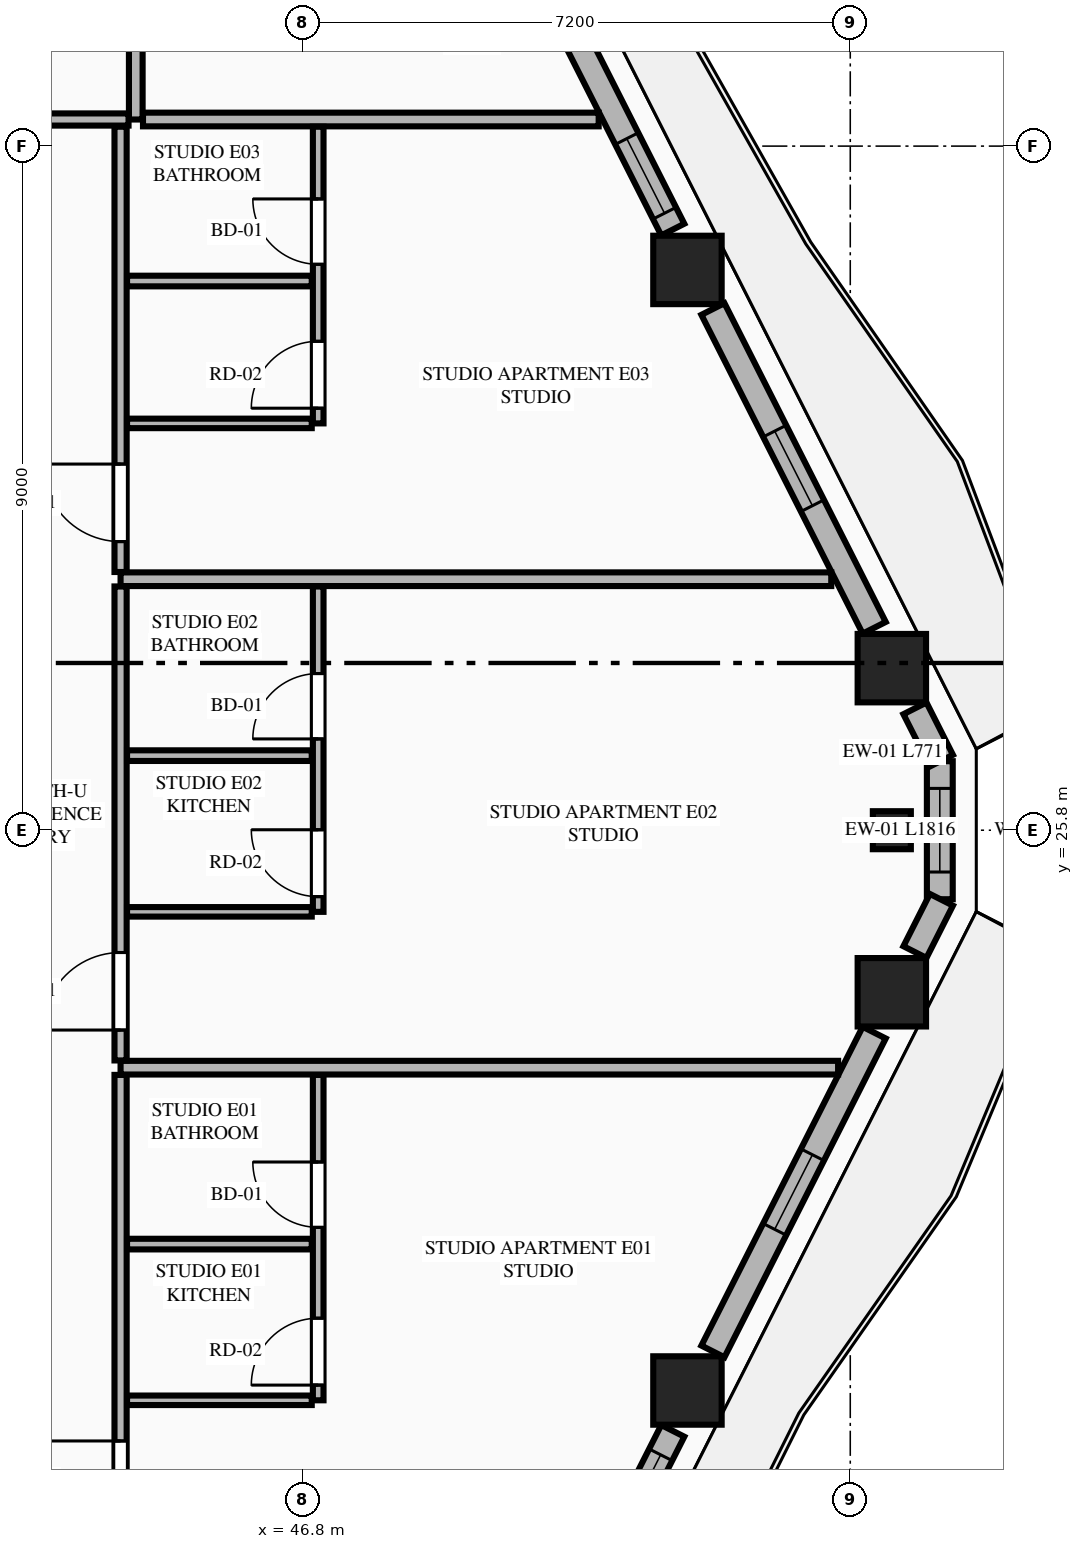
"""IFC4 building model, lengths in metres.
Left out: names, types, materials, properties, quantities, classifications, styles, units other than length and angle.
Written with IfcOpenShell. Run it as: python <this file> out.ifc"""

import sys

from ifc_helpers import new_model, si_unit, direction, frame, frame_2d, origin, origin_2d, place, context, subcontext, project, spatial, rectangle, extrude, element, fill, save


model = new_model("IFC4")
c1 = context("Model", 3, precision=1e-05, world=origin(), true_north=direction((0.0, 1.0)))
c2 = subcontext(c1, "Body", "Model", "MODEL_VIEW")
j1 = project(units=[si_unit("LENGTHUNIT", "METRE"), si_unit("PLANEANGLEUNIT", "RADIAN")], contexts=[c1])
p1 = place(None, origin())
s1 = spatial("IfcSite", under=j1, at=p1, CompositionType="ELEMENT")
p2 = place(p1, origin())
s2 = spatial("IfcBuilding", under=s1, at=p2, CompositionType="ELEMENT")
p3 = place(p2, frame((0.0, 0.0, 189.65)))
s3 = spatial("IfcBuildingStorey", under=s2, at=p3, CompositionType="ELEMENT", Elevation=189.65)
for number, where, z_axis, x_axis in (
    (1, (51.858, 18.429, 0.0), (0.0, 0.0, 1.0), (1.0, 0.0, 0.0)),
    (2, (54.547, 23.668, 0.0), (0.0, 0.0, 1.0), (1.0, 0.0, 0.0)),
    (3, (54.547, 27.932, 0.0), (0.0, 0.0, 1.0), (1.0, 0.0, 0.0)),
    (4, (51.858, 33.171, 0.0), (0.0, 0.0, 1.0), (1.0, 0.0, 0.0)),
):
    element("IfcColumn", number, at=place(p3, frame(where, z_axis=z_axis, x_axis=x_axis)), inside=s3, PredefinedType="COLUMN", context=c2, shape_type="SweptSolid", body=[
        extrude(rectangle(XDim=0.9, YDim=0.9, at=origin_2d()), origin(), (0.0, 0.0, 1.0), 3.55),
    ])
p4 = place(p3, frame((54.547, 25.8, 0.0), z_axis=(0.0, 0.0, 1.0), x_axis=(0.0, 1.0, 0.0)))
e5 = element("IfcColumn", 5, at=p4, inside=s3, PredefinedType="PILASTER", context=c2, shape_type="SweptSolid", body=[
    extrude(rectangle(XDim=0.5, YDim=0.35, at=origin_2d()), origin(), (0.0, 0.0, 1.0), 3.55),
])
p5 = place(p3, frame((55.178, 24.892, 0.0), z_axis=(0.0, 0.0, 1.0), x_axis=(0.0, 1.0, 0.0)))
e6 = element("IfcWall", 6, at=p5, inside=s3, PredefinedType="STANDARD", context=c2, shape_type="SweptSolid", body=[
    extrude(rectangle(XDim=1.816, YDim=0.34, at=frame_2d((0.908, 0.0))), origin(), (0.0, 0.0, 1.0), 3.35),
])
p6 = place(p5, frame((0.358, 0.0, 0.75)))
e7 = element("IfcOpeningElement", 7, at=p6, cuts=e6, PredefinedType="OPENING", context=c2, shape_type="SweptSolid", body=[
    extrude(rectangle(XDim=1.1, YDim=2.0, at=frame_2d((0.55, 1.0))), frame((0.0, 0.18, 0.0), z_axis=(0.0, -1.0, 0.0), x_axis=(1.0, 0.0, 0.0)), (0.0, 0.0, 1.0), 0.36),
])
p7 = place(p3, frame((49.448, 13.517, 0.0), z_axis=(0.0, 0.0, 1.0), x_axis=(0.451544279509, 0.892248711763, 0.0)))
e8 = element("IfcWall", 8, at=p7, inside=s3, PredefinedType="STANDARD", context=c2, shape_type="SweptSolid", body=[
    extrude(rectangle(XDim=4.91, YDim=0.34, at=frame_2d((2.455, 0.0))), origin(), (0.0, 0.0, 1.0), 2.883),
])
p8 = place(p7, frame((0.856, 0.0, 0.0)))
e9 = element("IfcOpeningElement", 9, at=p8, cuts=e8, PredefinedType="OPENING", context=c2, shape_type="SweptSolid", body=[
    extrude(rectangle(XDim=1.1, YDim=2.25, at=frame_2d((0.55, 1.125))), frame((0.0, 0.18, 0.0), z_axis=(0.0, -1.0, 0.0), x_axis=(1.0, 0.0, 0.0)), (0.0, 0.0, 1.0), 0.36),
])
p9 = place(p7, frame((3.457, 0.0, 0.75)))
e10 = element("IfcOpeningElement", 10, at=p9, cuts=e8, PredefinedType="OPENING", context=c2, shape_type="SweptSolid", body=[
    extrude(rectangle(XDim=1.1, YDim=1.983, at=frame_2d((0.55, 0.991))), frame((0.0, 0.18, 0.0), z_axis=(0.0, -1.0, 0.0), x_axis=(1.0, 0.0, 0.0)), (0.0, 0.0, 1.0), 0.36),
])
p10 = place(p3, frame((52.193, 18.943, 0.0), z_axis=(0.0, 0.0, 1.0), x_axis=(0.451447222193, 0.892297823361, 0.0)))
e11 = element("IfcWall", 11, at=p10, inside=s3, PredefinedType="STANDARD", context=c2, shape_type="SweptSolid", body=[
    extrude(rectangle(XDim=4.7, YDim=0.34, at=frame_2d((2.35, 0.0))), origin(), (0.0, 0.0, 1.0), 2.883),
])
p11 = place(p10, frame((1.8, 0.0, 0.75)))
e12 = element("IfcOpeningElement", 12, at=p11, cuts=e11, PredefinedType="OPENING", context=c2, shape_type="SweptSolid", body=[
    extrude(rectangle(XDim=1.1, YDim=1.983, at=frame_2d((0.55, 0.991))), frame((0.0, 0.18, 0.0), z_axis=(0.0, -1.0, 0.0), x_axis=(1.0, 0.0, 0.0)), (0.0, 0.0, 1.0), 0.36),
])
for number, where, z_axis, x_axis in (
    (13, (54.851, 24.197, 0.0), (0.0, 0.0, 1.0), (0.451, 0.892, 0.0)),
    (14, (55.199, 26.715, 0.0), (0.0, 0.0, 1.0), (-0.451, 0.892, 0.0)),
):
    element("IfcWall", number, at=place(p3, frame(where, z_axis=z_axis, x_axis=x_axis)), inside=s3, PredefinedType="STANDARD", context=c2, shape_type="SweptSolid", body=[
        extrude(rectangle(XDim=0.771, YDim=0.34, at=frame_2d((0.385, 0.0))), origin(), (0.0, 0.0, 1.0), 3.35),
    ])
p12 = place(p3, frame((54.315, 28.463, 0.0), z_axis=(0.0, 0.0, 1.0), x_axis=(-0.451426298588, 0.892308409096, 0.0)))
e15 = element("IfcWall", 15, at=p12, inside=s3, PredefinedType="STANDARD", context=c2, shape_type="SweptSolid", body=[
    extrude(rectangle(XDim=4.7, YDim=0.34, at=frame_2d((2.35, 0.0))), origin(), (0.0, 0.0, 1.0), 2.883),
])
p13 = place(p12, frame((1.8, 0.0, 0.75)))
e16 = element("IfcOpeningElement", 16, at=p13, cuts=e15, PredefinedType="OPENING", context=c2, shape_type="SweptSolid", body=[
    extrude(rectangle(XDim=1.1, YDim=1.983, at=frame_2d((0.55, 0.991))), frame((0.0, 0.18, 0.0), z_axis=(0.0, -1.0, 0.0), x_axis=(1.0, 0.0, 0.0)), (0.0, 0.0, 1.0), 0.36),
])
p14 = place(p3, frame((51.665, 33.702, 0.0), z_axis=(0.0, 0.0, 1.0), x_axis=(-0.451524246964, 0.89225884944, 0.0)))
e17 = element("IfcWall", 17, at=p14, inside=s3, PredefinedType="STANDARD", context=c2, shape_type="SweptSolid", body=[
    extrude(rectangle(XDim=4.91, YDim=0.34, at=frame_2d((2.455, 0.0))), origin(), (0.0, 0.0, 1.0), 2.883),
])
p15 = place(p14, frame((2.842, 0.0, 0.0)))
e18 = element("IfcOpeningElement", 18, at=p15, cuts=e17, PredefinedType="OPENING", context=c2, shape_type="SweptSolid", body=[
    extrude(rectangle(XDim=1.1, YDim=2.25, at=frame_2d((0.55, 1.125))), frame((0.0, 0.18, 0.0), z_axis=(0.0, -1.0, 0.0), x_axis=(1.0, 0.0, 0.0)), (0.0, 0.0, 1.0), 0.36),
])
p16 = place(p14, frame((0.241, 0.0, 0.75)))
e19 = element("IfcOpeningElement", 19, at=p16, cuts=e17, PredefinedType="OPENING", context=c2, shape_type="SweptSolid", body=[
    extrude(rectangle(XDim=1.1, YDim=1.983, at=frame_2d((0.55, 0.991))), frame((0.0, 0.18, 0.0), z_axis=(0.0, -1.0, 0.0), x_axis=(1.0, 0.0, 0.0)), (0.0, 0.0, 1.0), 0.36),
])
p17 = place(p3, frame((44.6, 35.15, 0.0), z_axis=(0.0, 0.0, 1.0), x_axis=(0.0, 1.0, 0.0)))
e20 = element("IfcWall", 20, at=p17, inside=s3, PredefinedType="PARTITIONING", context=c2, shape_type="SweptSolid", body=[
    extrude(rectangle(XDim=10.482, YDim=0.18, at=frame_2d((5.241, 0.0))), origin(), (0.0, 0.0, 1.0), 3.35),
])
p18 = place(p3, frame((20.295, 35.15, 0.0), z_axis=(0.0, 0.0, 1.0), x_axis=(1.0, 0.0, 0.0)))
e21 = element("IfcWall", 21, at=p18, inside=s3, PredefinedType="PARTITIONING", context=c2, shape_type="SweptSolid", body=[
    extrude(rectangle(XDim=24.21, YDim=0.16, at=frame_2d((12.105, 0.0))), origin(), (0.0, 0.0, 1.0), 3.35),
])
p19 = place(p18, frame((0.405, 0.0, 0.0)))
e22 = element("IfcOpeningElement", 22, at=p19, cuts=e21, PredefinedType="OPENING", context=c2, shape_type="SweptSolid", body=[
    extrude(rectangle(XDim=1.35, YDim=2.35, at=frame_2d((0.675, 1.175))), frame((0.0, 0.09, 0.0), z_axis=(0.0, -1.0, 0.0), x_axis=(1.0, 0.0, 0.0)), (0.0, 0.0, 1.0), 0.18),
])
p20 = place(p3, frame((44.695, 35.15, 0.0), z_axis=(0.0, 0.0, 1.0), x_axis=(1.0, 0.0, 0.0)))
e23 = element("IfcWall", 23, at=p20, inside=s3, PredefinedType="PARTITIONING", context=c2, shape_type="SweptSolid", body=[
    extrude(rectangle(XDim=5.995, YDim=0.18, at=frame_2d((2.998, 0.0))), origin(), (0.0, 0.0, 1.0), 3.35),
])
p21 = place(p3, frame((44.4, 16.345, 0.0), z_axis=(0.0, 0.0, 1.0), x_axis=(0.0, 1.0, 0.0)))
e24 = element("IfcWall", 24, at=p21, inside=s3, PredefinedType="PARTITIONING", context=c2, shape_type="SweptSolid", body=[
    extrude(rectangle(XDim=6.236, YDim=0.16, at=frame_2d((3.118, 0.0))), origin(), (0.0, 0.0, 1.0), 3.35),
])
p22 = place(p21, frame((0.4, 0.0, 0.0)))
e25 = element("IfcOpeningElement", 25, at=p22, cuts=e24, PredefinedType="OPENING", context=c2, shape_type="SweptSolid", body=[
    extrude(rectangle(XDim=1.02, YDim=2.25, at=frame_2d((0.51, 1.125))), frame((0.0, 0.09, 0.0), z_axis=(0.0, -1.0, 0.0), x_axis=(1.0, 0.0, 0.0)), (0.0, 0.0, 1.0), 0.18),
])
p23 = place(p3, frame((44.485, 18.3, 0.0), z_axis=(0.0, 0.0, 1.0), x_axis=(1.0, 0.0, 0.0)))
e26 = element("IfcWall", 26, at=p23, inside=s3, PredefinedType="PARTITIONING", context=c2, shape_type="SweptSolid", body=[
    extrude(rectangle(XDim=2.43, YDim=0.125, at=frame_2d((1.215, 0.0))), origin(), (0.0, 0.0, 1.0), 2.807),
])
p24 = place(p3, frame((47.0, 18.3, 0.0), z_axis=(0.0, 0.0, 1.0), x_axis=(0.0, 1.0, 0.0)))
e27 = element("IfcWall", 27, at=p24, inside=s3, PredefinedType="PLUMBINGWALL", context=c2, shape_type="SweptSolid", body=[
    extrude(rectangle(XDim=4.281, YDim=0.14, at=frame_2d((2.141, 0.0))), origin(), (0.0, 0.0, 1.0), 3.35),
])
p25 = place(p24, frame((2.275, 0.0, 0.0)))
e28 = element("IfcOpeningElement", 28, at=p25, cuts=e27, PredefinedType="OPENING", context=c2, shape_type="SweptSolid", body=[
    extrude(rectangle(XDim=0.86, YDim=2.1, at=frame_2d((0.43, 1.05))), frame((0.0, 0.08, 0.0), z_axis=(0.0, -1.0, 0.0), x_axis=(1.0, 0.0, 0.0)), (0.0, 0.0, 1.0), 0.16),
])
p26 = place(p24, frame((0.2, 0.0, 0.0)))
e29 = element("IfcOpeningElement", 29, at=p26, cuts=e27, PredefinedType="OPENING", context=c2, shape_type="SweptSolid", body=[
    extrude(rectangle(XDim=0.88, YDim=2.15, at=frame_2d((0.44, 1.075))), frame((0.0, 0.08, 0.0), z_axis=(0.0, -1.0, 0.0), x_axis=(1.0, 0.0, 0.0)), (0.0, 0.0, 1.0), 0.16),
])
p27 = place(p3, frame((44.485, 20.355, 0.0), z_axis=(0.0, 0.0, 1.0), x_axis=(1.0, 0.0, 0.0)))
e30 = element("IfcWall", 30, at=p27, inside=s3, PredefinedType="PLUMBINGWALL", context=c2, shape_type="SweptSolid", body=[
    extrude(rectangle(XDim=2.43, YDim=0.14, at=frame_2d((1.215, 0.0))), origin(), (0.0, 0.0, 1.0), 3.35),
])
p28 = place(p3, frame((44.4, 22.676, 0.0), z_axis=(0.0, 0.0, 1.0), x_axis=(1.0, 0.0, 0.0)))
e31 = element("IfcWall", 31, at=p28, inside=s3, PredefinedType="PARTITIONING", context=c2, shape_type="SweptSolid", body=[
    extrude(rectangle(XDim=9.44, YDim=0.18, at=frame_2d((4.72, 0.0))), origin(), (0.0, 0.0, 1.0), 3.35),
])
p29 = place(p3, frame((44.4, 22.771, 0.0), z_axis=(0.0, 0.0, 1.0), x_axis=(0.0, 1.0, 0.0)))
e32 = element("IfcWall", 32, at=p29, inside=s3, PredefinedType="PARTITIONING", context=c2, shape_type="SweptSolid", body=[
    extrude(rectangle(XDim=6.236, YDim=0.16, at=frame_2d((3.118, 0.0))), origin(), (0.0, 0.0, 1.0), 3.35),
])
p30 = place(p29, frame((0.4, 0.0, 0.0)))
e33 = element("IfcOpeningElement", 33, at=p30, cuts=e32, PredefinedType="OPENING", context=c2, shape_type="SweptSolid", body=[
    extrude(rectangle(XDim=1.02, YDim=2.25, at=frame_2d((0.51, 1.125))), frame((0.0, 0.09, 0.0), z_axis=(0.0, -1.0, 0.0), x_axis=(1.0, 0.0, 0.0)), (0.0, 0.0, 1.0), 0.18),
])
p31 = place(p3, frame((44.485, 24.726, 0.0), z_axis=(0.0, 0.0, 1.0), x_axis=(1.0, 0.0, 0.0)))
e34 = element("IfcWall", 34, at=p31, inside=s3, PredefinedType="PARTITIONING", context=c2, shape_type="SweptSolid", body=[
    extrude(rectangle(XDim=2.43, YDim=0.125, at=frame_2d((1.215, 0.0))), origin(), (0.0, 0.0, 1.0), 3.35),
])
p32 = place(p3, frame((47.0, 24.726, 0.0), z_axis=(0.0, 0.0, 1.0), x_axis=(0.0, 1.0, 0.0)))
e35 = element("IfcWall", 35, at=p32, inside=s3, PredefinedType="PLUMBINGWALL", context=c2, shape_type="SweptSolid", body=[
    extrude(rectangle(XDim=4.281, YDim=0.14, at=frame_2d((2.141, 0.0))), origin(), (0.0, 0.0, 1.0), 3.35),
])
p33 = place(p32, frame((2.275, 0.0, 0.0)))
e36 = element("IfcOpeningElement", 36, at=p33, cuts=e35, PredefinedType="OPENING", context=c2, shape_type="SweptSolid", body=[
    extrude(rectangle(XDim=0.86, YDim=2.1, at=frame_2d((0.43, 1.05))), frame((0.0, 0.08, 0.0), z_axis=(0.0, -1.0, 0.0), x_axis=(1.0, 0.0, 0.0)), (0.0, 0.0, 1.0), 0.16),
])
p34 = place(p32, frame((0.2, 0.0, 0.0)))
e37 = element("IfcOpeningElement", 37, at=p34, cuts=e35, PredefinedType="OPENING", context=c2, shape_type="SweptSolid", body=[
    extrude(rectangle(XDim=0.88, YDim=2.15, at=frame_2d((0.44, 1.075))), frame((0.0, 0.08, 0.0), z_axis=(0.0, -1.0, 0.0), x_axis=(1.0, 0.0, 0.0)), (0.0, 0.0, 1.0), 0.16),
])
p35 = place(p3, frame((44.485, 26.781, 0.0), z_axis=(0.0, 0.0, 1.0), x_axis=(1.0, 0.0, 0.0)))
e38 = element("IfcWall", 38, at=p35, inside=s3, PredefinedType="PLUMBINGWALL", context=c2, shape_type="SweptSolid", body=[
    extrude(rectangle(XDim=2.43, YDim=0.14, at=frame_2d((1.215, 0.0))), origin(), (0.0, 0.0, 1.0), 3.35),
])
p36 = place(p3, frame((44.4, 29.102, 0.0), z_axis=(0.0, 0.0, 1.0), x_axis=(1.0, 0.0, 0.0)))
e39 = element("IfcWall", 39, at=p36, inside=s3, PredefinedType="PARTITIONING", context=c2, shape_type="SweptSolid", body=[
    extrude(rectangle(XDim=9.35, YDim=0.18, at=frame_2d((4.675, 0.0))), origin(), (0.0, 0.0, 1.0), 3.35),
])
p37 = place(p3, frame((44.4, 29.197, 0.0), z_axis=(0.0, 0.0, 1.0), x_axis=(0.0, 1.0, 0.0)))
e40 = element("IfcWall", 40, at=p37, inside=s3, PredefinedType="PARTITIONING", context=c2, shape_type="SweptSolid", body=[
    extrude(rectangle(XDim=5.858, YDim=0.16, at=frame_2d((2.929, 0.0))), origin(), (0.0, 0.0, 1.0), 3.35),
])
p38 = place(p37, frame((0.4, 0.0, 0.0)))
e41 = element("IfcOpeningElement", 41, at=p38, cuts=e40, PredefinedType="OPENING", context=c2, shape_type="SweptSolid", body=[
    extrude(rectangle(XDim=1.02, YDim=2.25, at=frame_2d((0.51, 1.125))), frame((0.0, 0.09, 0.0), z_axis=(0.0, -1.0, 0.0), x_axis=(1.0, 0.0, 0.0)), (0.0, 0.0, 1.0), 0.18),
])
p39 = place(p3, frame((44.485, 31.152, 0.0), z_axis=(0.0, 0.0, 1.0), x_axis=(1.0, 0.0, 0.0)))
e42 = element("IfcWall", 42, at=p39, inside=s3, PredefinedType="PARTITIONING", context=c2, shape_type="SweptSolid", body=[
    extrude(rectangle(XDim=2.43, YDim=0.125, at=frame_2d((1.215, 0.0))), origin(), (0.0, 0.0, 1.0), 3.35),
])
p40 = place(p3, frame((47.0, 31.152, 0.0), z_axis=(0.0, 0.0, 1.0), x_axis=(0.0, 1.0, 0.0)))
e43 = element("IfcWall", 43, at=p40, inside=s3, PredefinedType="PLUMBINGWALL", context=c2, shape_type="SweptSolid", body=[
    extrude(rectangle(XDim=3.903, YDim=0.14, at=frame_2d((1.951, 0.0))), origin(), (0.0, 0.0, 1.0), 3.35),
])
p41 = place(p40, frame((2.093, 0.0, 0.0)))
e44 = element("IfcOpeningElement", 44, at=p41, cuts=e43, PredefinedType="OPENING", context=c2, shape_type="SweptSolid", body=[
    extrude(rectangle(XDim=0.86, YDim=2.1, at=frame_2d((0.43, 1.05))), frame((0.0, 0.08, 0.0), z_axis=(0.0, -1.0, 0.0), x_axis=(1.0, 0.0, 0.0)), (0.0, 0.0, 1.0), 0.16),
])
p42 = place(p40, frame((0.2, 0.0, 0.0)))
e45 = element("IfcOpeningElement", 45, at=p42, cuts=e43, PredefinedType="OPENING", context=c2, shape_type="SweptSolid", body=[
    extrude(rectangle(XDim=0.88, YDim=2.15, at=frame_2d((0.44, 1.075))), frame((0.0, 0.08, 0.0), z_axis=(0.0, -1.0, 0.0), x_axis=(1.0, 0.0, 0.0)), (0.0, 0.0, 1.0), 0.16),
])
p43 = place(p3, frame((44.485, 33.025, 0.0), z_axis=(0.0, 0.0, 1.0), x_axis=(1.0, 0.0, 0.0)))
e46 = element("IfcWall", 46, at=p43, inside=s3, PredefinedType="PLUMBINGWALL", context=c2, shape_type="SweptSolid", body=[
    extrude(rectangle(XDim=2.43, YDim=0.14, at=frame_2d((1.215, 0.0))), origin(), (0.0, 0.0, 1.0), 3.35),
])
p44 = place(p11, origin())
e47 = element("IfcWindow", 47, at=p44, inside=s3, PartitioningType="SINGLE_PANEL", PredefinedType="WINDOW", context=c2, shape_type="SweptSolid", body=[
    extrude(rectangle(XDim=1.1, YDim=1.983, at=frame_2d((0.55, 0.991))), frame((0.0, 0.03, 0.0), z_axis=(0.0, -1.0, 0.0), x_axis=(1.0, 0.0, 0.0)), (0.0, 0.0, 1.0), 0.06),
])
fill(e12, e47)
p45 = place(p13, origin())
e48 = element("IfcWindow", 48, at=p45, inside=s3, PartitioningType="SINGLE_PANEL", PredefinedType="WINDOW", context=c2, shape_type="SweptSolid", body=[
    extrude(rectangle(XDim=1.1, YDim=1.983, at=frame_2d((0.55, 0.991))), frame((0.0, 0.03, 0.0), z_axis=(0.0, -1.0, 0.0), x_axis=(1.0, 0.0, 0.0)), (0.0, 0.0, 1.0), 0.06),
])
fill(e16, e48)
p46 = place(p25, origin())
e49 = element("IfcDoor", 49, at=p46, inside=s3, OperationType="SINGLE_SWING_RIGHT", PredefinedType="DOOR", context=c2, shape_type="SweptSolid", body=[
    extrude(rectangle(XDim=0.86, YDim=2.1, at=frame_2d((0.43, 1.05))), frame((0.0, 0.025, 0.0), z_axis=(0.0, -1.0, 0.0), x_axis=(1.0, 0.0, 0.0)), (0.0, 0.0, 1.0), 0.05),
])
fill(e28, e49)
p47 = place(p22, origin())
e50 = element("IfcDoor", 50, at=p47, inside=s3, OperationType="SINGLE_SWING_RIGHT", PredefinedType="DOOR", context=c2, shape_type="SweptSolid", body=[
    extrude(rectangle(XDim=1.02, YDim=2.25, at=frame_2d((0.51, 1.125))), frame((0.0, 0.025, 0.0), z_axis=(0.0, -1.0, 0.0), x_axis=(1.0, 0.0, 0.0)), (0.0, 0.0, 1.0), 0.05),
])
fill(e25, e50)
p48 = place(p26, origin())
e51 = element("IfcDoor", 51, at=p48, inside=s3, OperationType="SINGLE_SWING_LEFT", PredefinedType="DOOR", context=c2, shape_type="SweptSolid", body=[
    extrude(rectangle(XDim=0.88, YDim=2.15, at=frame_2d((0.44, 1.075))), frame((0.0, 0.025, 0.0), z_axis=(0.0, -1.0, 0.0), x_axis=(1.0, 0.0, 0.0)), (0.0, 0.0, 1.0), 0.05),
])
fill(e29, e51)
p49 = place(p33, origin())
e52 = element("IfcDoor", 52, at=p49, inside=s3, OperationType="SINGLE_SWING_LEFT", PredefinedType="DOOR", context=c2, shape_type="SweptSolid", body=[
    extrude(rectangle(XDim=0.86, YDim=2.1, at=frame_2d((0.43, 1.05))), frame((0.0, 0.025, 0.0), z_axis=(0.0, -1.0, 0.0), x_axis=(1.0, 0.0, 0.0)), (0.0, 0.0, 1.0), 0.05),
])
fill(e36, e52)
p50 = place(p30, origin())
e53 = element("IfcDoor", 53, at=p50, inside=s3, OperationType="SINGLE_SWING_LEFT", PredefinedType="DOOR", context=c2, shape_type="SweptSolid", body=[
    extrude(rectangle(XDim=1.02, YDim=2.25, at=frame_2d((0.51, 1.125))), frame((0.0, 0.025, 0.0), z_axis=(0.0, -1.0, 0.0), x_axis=(1.0, 0.0, 0.0)), (0.0, 0.0, 1.0), 0.05),
])
fill(e33, e53)
p51 = place(p34, origin())
e54 = element("IfcDoor", 54, at=p51, inside=s3, OperationType="SINGLE_SWING_RIGHT", PredefinedType="DOOR", context=c2, shape_type="SweptSolid", body=[
    extrude(rectangle(XDim=0.88, YDim=2.15, at=frame_2d((0.44, 1.075))), frame((0.0, 0.025, 0.0), z_axis=(0.0, -1.0, 0.0), x_axis=(1.0, 0.0, 0.0)), (0.0, 0.0, 1.0), 0.05),
])
fill(e37, e54)
p52 = place(p41, origin())
e55 = element("IfcDoor", 55, at=p52, inside=s3, OperationType="SINGLE_SWING_RIGHT", PredefinedType="DOOR", context=c2, shape_type="SweptSolid", body=[
    extrude(rectangle(XDim=0.86, YDim=2.1, at=frame_2d((0.43, 1.05))), frame((0.0, 0.025, 0.0), z_axis=(0.0, -1.0, 0.0), x_axis=(1.0, 0.0, 0.0)), (0.0, 0.0, 1.0), 0.05),
])
fill(e44, e55)
p53 = place(p38, origin())
e56 = element("IfcDoor", 56, at=p53, inside=s3, OperationType="SINGLE_SWING_RIGHT", PredefinedType="DOOR", context=c2, shape_type="SweptSolid", body=[
    extrude(rectangle(XDim=1.02, YDim=2.25, at=frame_2d((0.51, 1.125))), frame((0.0, 0.025, 0.0), z_axis=(0.0, -1.0, 0.0), x_axis=(1.0, 0.0, 0.0)), (0.0, 0.0, 1.0), 0.05),
])
fill(e41, e56)
p54 = place(p42, origin())
e57 = element("IfcDoor", 57, at=p54, inside=s3, OperationType="SINGLE_SWING_LEFT", PredefinedType="DOOR", context=c2, shape_type="SweptSolid", body=[
    extrude(rectangle(XDim=0.88, YDim=2.15, at=frame_2d((0.44, 1.075))), frame((0.0, 0.025, 0.0), z_axis=(0.0, -1.0, 0.0), x_axis=(1.0, 0.0, 0.0)), (0.0, 0.0, 1.0), 0.05),
])
fill(e45, e57)
p55 = place(p9, origin())
e58 = element("IfcWindow", 58, at=p55, inside=s3, PartitioningType="SINGLE_PANEL", PredefinedType="WINDOW", context=c2, shape_type="SweptSolid", body=[
    extrude(rectangle(XDim=1.1, YDim=1.983, at=frame_2d((0.55, 0.991))), frame((0.0, 0.03, 0.0), z_axis=(0.0, -1.0, 0.0), x_axis=(1.0, 0.0, 0.0)), (0.0, 0.0, 1.0), 0.06),
])
fill(e10, e58)
p56 = place(p16, origin())
e59 = element("IfcWindow", 59, at=p56, inside=s3, PartitioningType="SINGLE_PANEL", PredefinedType="WINDOW", context=c2, shape_type="SweptSolid", body=[
    extrude(rectangle(XDim=1.1, YDim=1.983, at=frame_2d((0.55, 0.991))), frame((0.0, 0.03, 0.0), z_axis=(0.0, -1.0, 0.0), x_axis=(1.0, 0.0, 0.0)), (0.0, 0.0, 1.0), 0.06),
])
fill(e19, e59)
p57 = place(p6, origin())
e60 = element("IfcWindow", 60, at=p57, inside=s3, PartitioningType="SINGLE_PANEL", PredefinedType="WINDOW", context=c2, shape_type="SweptSolid", body=[
    extrude(rectangle(XDim=1.1, YDim=2.0, at=frame_2d((0.55, 1.0))), frame((0.0, 0.03, 0.0), z_axis=(0.0, -1.0, 0.0), x_axis=(1.0, 0.0, 0.0)), (0.0, 0.0, 1.0), 0.06),
])
fill(e7, e60)
save(model, sys.argv[1])
